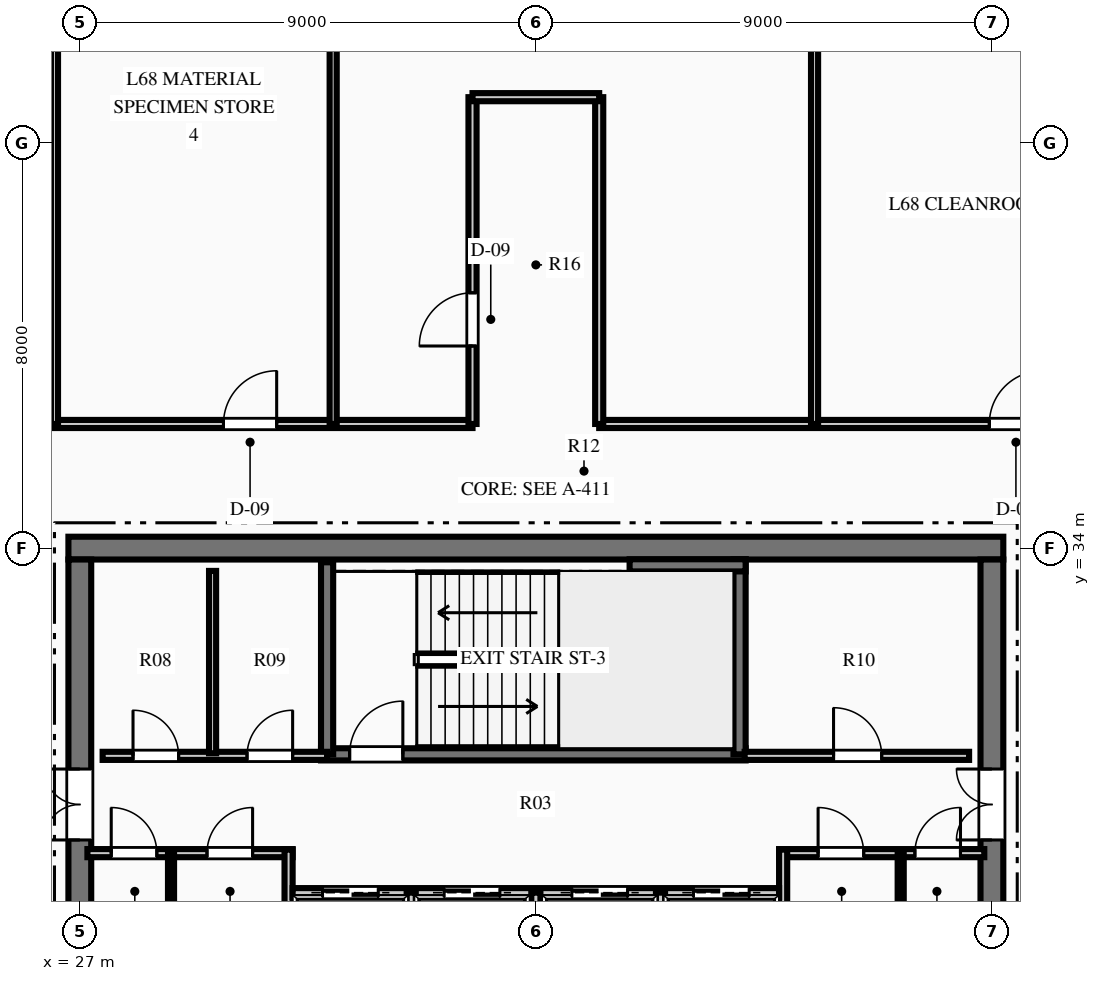
"""IFC4 building model, lengths in metres.
Left out: names, types, materials, properties, quantities, classifications, styles, units other than length and angle.
Written with IfcOpenShell. Run it as: python <this file> out.ifc"""

import sys

from ifc_helpers import new_model, si_unit, direction, frame, frame_2d, origin, place, context, subcontext, project, spatial, rectangle, extrude, element, fill, save


model = new_model("IFC4")
c1 = context("Model", 3, precision=1e-05, world=origin(), true_north=direction((0.0, 1.0)))
c2 = subcontext(c1, "Body", "Model", "MODEL_VIEW")
j1 = project(units=[si_unit("LENGTHUNIT", "METRE"), si_unit("PLANEANGLEUNIT", "RADIAN")], contexts=[c1])
p1 = place(None, origin())
s1 = spatial("IfcSite", under=j1, at=p1, CompositionType="ELEMENT")
p2 = place(p1, origin())
s2 = spatial("IfcBuilding", under=s1, at=p2, CompositionType="ELEMENT")
p3 = place(p2, frame((0.0, 0.0, 271.2)))
s3 = spatial("IfcBuildingStorey", under=s2, at=p3, CompositionType="ELEMENT", Elevation=271.2)
p4 = place(p3, frame((26.775, 34.0, 0.0), z_axis=(0.0, 0.0, 1.0), x_axis=(1.0, 0.0, 0.0)))
e1 = element("IfcWall", 1, at=p4, inside=s3, PredefinedType="SHEAR", context=c2, shape_type="SweptSolid", body=[
    extrude(rectangle(XDim=18.45, YDim=0.45, at=frame_2d((9.225, 0.0))), origin(), (0.0, 0.0, 1.0), 3.75),
])
p5 = place(p3, frame((27.0, 18.225, 0.0), z_axis=(0.0, 0.0, 1.0), x_axis=(0.0, 1.0, 0.0)))
e2 = element("IfcWall", 2, at=p5, inside=s3, PredefinedType="SHEAR", context=c2, shape_type="SweptSolid", body=[
    extrude(rectangle(XDim=15.55, YDim=0.45, at=frame_2d((7.775, 0.0))), origin(), (0.0, 0.0, 1.0), 3.75),
])
p6 = place(p5, frame((10.015, 0.0, 0.0)))
e3 = element("IfcOpeningElement", 3, at=p6, cuts=e2, PredefinedType="OPENING", context=c2, shape_type="SweptSolid", body=[
    extrude(rectangle(XDim=1.4, YDim=2.2, at=frame_2d((0.7, 1.1))), frame((0.0, 0.235, 0.0), z_axis=(0.0, -1.0, 0.0), x_axis=(1.0, 0.0, 0.0)), (0.0, 0.0, 1.0), 0.47),
])
p7 = place(p3, frame((45.0, 18.225, 0.0), z_axis=(0.0, 0.0, 1.0), x_axis=(0.0, 1.0, 0.0)))
e4 = element("IfcWall", 4, at=p7, inside=s3, PredefinedType="SHEAR", context=c2, shape_type="SweptSolid", body=[
    extrude(rectangle(XDim=15.55, YDim=0.45, at=frame_2d((7.775, 0.0))), origin(), (0.0, 0.0, 1.0), 3.75),
])
p8 = place(p7, frame((10.015, 0.0, 0.0)))
e5 = element("IfcOpeningElement", 5, at=p8, cuts=e4, PredefinedType="OPENING", context=c2, shape_type="SweptSolid", body=[
    extrude(rectangle(XDim=1.4, YDim=2.2, at=frame_2d((0.7, 1.1))), frame((0.0, 0.235, 0.0), z_axis=(0.0, -1.0, 0.0), x_axis=(1.0, 0.0, 0.0)), (0.0, 0.0, 1.0), 0.47),
])
p9 = place(p3, frame((31.76, 29.93, 0.0), z_axis=(0.0, 0.0, 1.0), x_axis=(1.0, 0.0, 0.0)))
e6 = element("IfcWall", 6, at=p9, inside=s3, PredefinedType="SHEAR", context=c2, shape_type="SweptSolid", body=[
    extrude(rectangle(XDim=8.38, YDim=0.24, at=frame_2d((4.19, 0.0))), origin(), (0.0, 0.0, 1.0), 3.75),
])
p10 = place(p9, frame((0.565, 0.0, 0.0)))
e7 = element("IfcOpeningElement", 7, at=p10, cuts=e6, PredefinedType="OPENING", context=c2, shape_type="SweptSolid", body=[
    extrude(rectangle(XDim=1.05, YDim=2.15, at=frame_2d((0.525, 1.075))), frame((0.0, 0.13, 0.0), z_axis=(0.0, -1.0, 0.0), x_axis=(1.0, 0.0, 0.0)), (0.0, 0.0, 1.0), 0.26),
])
p11 = place(p3, frame((31.88, 29.93, 0.0), z_axis=(0.0, 0.0, 1.0), x_axis=(0.0, 1.0, 0.0)))
e8 = element("IfcWall", 8, at=p11, inside=s3, PredefinedType="SHEAR", context=c2, shape_type="SweptSolid", body=[
    extrude(rectangle(XDim=3.79, YDim=0.24, at=frame_2d((1.895, 0.0))), origin(), (0.0, 0.0, 1.0), 3.75),
])
p12 = place(p3, frame((40.02, 29.93, 0.0), z_axis=(0.0, 0.0, 1.0), x_axis=(0.0, 1.0, 0.0)))
e9 = element("IfcWall", 9, at=p12, inside=s3, PredefinedType="SHEAR", context=c2, shape_type="SweptSolid", body=[
    extrude(rectangle(XDim=3.85, YDim=0.24, at=frame_2d((1.925, 0.0))), origin(), (0.0, 0.0, 1.0), 3.75),
])
p13 = place(p3, frame((37.85, 33.66, 0.0), z_axis=(0.0, 0.0, 1.0), x_axis=(1.0, 0.0, 0.0)))
e10 = element("IfcWall", 10, at=p13, inside=s3, PredefinedType="SHEAR", context=c2, shape_type="SweptSolid", body=[
    extrude(rectangle(XDim=2.29, YDim=0.24, at=frame_2d((1.145, 0.0))), origin(), (0.0, 0.0, 1.0), 3.75),
])
p14 = place(p3, frame((27.15, 27.98, 0.0), z_axis=(0.0, 0.0, 1.0), x_axis=(1.0, 0.0, 0.0)))
e11 = element("IfcWall", 11, at=p14, inside=s3, PredefinedType="PARTITIONING", context=c2, shape_type="SweptSolid", body=[
    extrude(rectangle(XDim=4.05, YDim=0.16, at=frame_2d((2.025, 0.0))), origin(), (0.0, 0.0, 1.0), 3.48),
])
p15 = place(p14, frame((0.47, 0.0, 0.0)))
e12 = element("IfcOpeningElement", 12, at=p15, cuts=e11, PredefinedType="OPENING", context=c2, shape_type="SweptSolid", body=[
    extrude(rectangle(XDim=0.9, YDim=2.15, at=frame_2d((0.45, 1.075))), frame((0.0, 0.09, 0.0), z_axis=(0.0, -1.0, 0.0), x_axis=(1.0, 0.0, 0.0)), (0.0, 0.0, 1.0), 0.18),
])
p16 = place(p14, frame((2.36, 0.0, 0.0)))
e13 = element("IfcOpeningElement", 13, at=p16, cuts=e11, PredefinedType="OPENING", context=c2, shape_type="SweptSolid", body=[
    extrude(rectangle(XDim=0.9, YDim=2.15, at=frame_2d((0.45, 1.075))), frame((0.0, 0.09, 0.0), z_axis=(0.0, -1.0, 0.0), x_axis=(1.0, 0.0, 0.0)), (0.0, 0.0, 1.0), 0.18),
])
p17 = place(p3, frame((31.12, 26.54, 0.0), z_axis=(0.0, 0.0, 1.0), x_axis=(0.0, 1.0, 0.0)))
e14 = element("IfcWall", 14, at=p17, inside=s3, PredefinedType="PARTITIONING", context=c2, shape_type="SweptSolid", body=[
    extrude(rectangle(XDim=1.51, YDim=0.16, at=frame_2d((0.755, 0.0))), origin(), (0.0, 0.0, 1.0), 3.48),
])
p18 = place(p3, frame((40.8, 27.98, 0.0), z_axis=(0.0, 0.0, 1.0), x_axis=(1.0, 0.0, 0.0)))
e15 = element("IfcWall", 15, at=p18, inside=s3, PredefinedType="PARTITIONING", context=c2, shape_type="SweptSolid", body=[
    extrude(rectangle(XDim=4.05, YDim=0.16, at=frame_2d((2.025, 0.0))), origin(), (0.0, 0.0, 1.0), 3.48),
])
p19 = place(p18, frame((0.77, 0.0, 0.0)))
e16 = element("IfcOpeningElement", 16, at=p19, cuts=e15, PredefinedType="OPENING", context=c2, shape_type="SweptSolid", body=[
    extrude(rectangle(XDim=0.9, YDim=2.15, at=frame_2d((0.45, 1.075))), frame((0.0, 0.09, 0.0), z_axis=(0.0, -1.0, 0.0), x_axis=(1.0, 0.0, 0.0)), (0.0, 0.0, 1.0), 0.18),
])
p20 = place(p18, frame((2.68, 0.0, 0.0)))
e17 = element("IfcOpeningElement", 17, at=p20, cuts=e15, PredefinedType="OPENING", context=c2, shape_type="SweptSolid", body=[
    extrude(rectangle(XDim=0.9, YDim=2.15, at=frame_2d((0.45, 1.075))), frame((0.0, 0.09, 0.0), z_axis=(0.0, -1.0, 0.0), x_axis=(1.0, 0.0, 0.0)), (0.0, 0.0, 1.0), 0.18),
])
p21 = place(p3, frame((40.88, 26.54, 0.0), z_axis=(0.0, 0.0, 1.0), x_axis=(0.0, 1.0, 0.0)))
e18 = element("IfcWall", 18, at=p21, inside=s3, PredefinedType="PARTITIONING", context=c2, shape_type="SweptSolid", body=[
    extrude(rectangle(XDim=1.51, YDim=0.16, at=frame_2d((0.755, 0.0))), origin(), (0.0, 0.0, 1.0), 3.48),
])
for number, where, z_axis, x_axis in (
    (19, (28.8, 26.54, 0.0), (0.0, 0.0, 1.0), (0.0, 1.0, 0.0)),
    (20, (43.2, 26.54, 0.0), (0.0, 0.0, 1.0), (0.0, 1.0, 0.0)),
):
    element("IfcWall", number, at=place(p3, frame(where, z_axis=z_axis, x_axis=x_axis)), inside=s3, PredefinedType="PARTITIONING", context=c2, shape_type="SweptSolid", body=[
        extrude(rectangle(XDim=1.44, YDim=0.12, at=frame_2d((0.72, 0.0))), origin(), (0.0, 0.0, 1.0), 3.48),
    ])
p22 = place(p3, frame((27.45, 29.9, 0.0), z_axis=(0.0, 0.0, 1.0), x_axis=(1.0, 0.0, 0.0)))
e21 = element("IfcWall", 21, at=p22, inside=s3, PredefinedType="PARTITIONING", context=c2, shape_type="SweptSolid", body=[
    extrude(rectangle(XDim=4.43, YDim=0.16, at=frame_2d((2.215, 0.0))), origin(), (0.0, 0.0, 1.0), 3.48),
])
p23 = place(p22, frame((0.6, 0.0, 0.0)))
e22 = element("IfcOpeningElement", 22, at=p23, cuts=e21, PredefinedType="OPENING", context=c2, shape_type="SweptSolid", body=[
    extrude(rectangle(XDim=0.9, YDim=2.15, at=frame_2d((0.45, 1.075))), frame((0.0, 0.09, 0.0), z_axis=(0.0, -1.0, 0.0), x_axis=(1.0, 0.0, 0.0)), (0.0, 0.0, 1.0), 0.18),
])
p24 = place(p22, frame((2.85, 0.0, 0.0)))
e23 = element("IfcOpeningElement", 23, at=p24, cuts=e21, PredefinedType="OPENING", context=c2, shape_type="SweptSolid", body=[
    extrude(rectangle(XDim=0.9, YDim=2.15, at=frame_2d((0.45, 1.075))), frame((0.0, 0.09, 0.0), z_axis=(0.0, -1.0, 0.0), x_axis=(1.0, 0.0, 0.0)), (0.0, 0.0, 1.0), 0.18),
])
p25 = place(p3, frame((29.62, 29.95, 0.0), z_axis=(0.0, 0.0, 1.0), x_axis=(0.0, 1.0, 0.0)))
e24 = element("IfcWall", 24, at=p25, inside=s3, PredefinedType="PARTITIONING", context=c2, shape_type="SweptSolid", body=[
    extrude(rectangle(XDim=3.6, YDim=0.14, at=frame_2d((1.8, 0.0))), origin(), (0.0, 0.0, 1.0), 3.48),
])
p26 = place(p3, frame((40.12, 29.9, 0.0), z_axis=(0.0, 0.0, 1.0), x_axis=(1.0, 0.0, 0.0)))
e25 = element("IfcWall", 25, at=p26, inside=s3, PredefinedType="PARTITIONING", context=c2, shape_type="SweptSolid", body=[
    extrude(rectangle(XDim=4.43, YDim=0.16, at=frame_2d((2.215, 0.0))), origin(), (0.0, 0.0, 1.0), 3.48),
])
p27 = place(p26, frame((1.755, 0.0, 0.0)))
e26 = element("IfcOpeningElement", 26, at=p27, cuts=e25, PredefinedType="OPENING", context=c2, shape_type="SweptSolid", body=[
    extrude(rectangle(XDim=0.95, YDim=2.15, at=frame_2d((0.475, 1.075))), frame((0.0, 0.09, 0.0), z_axis=(0.0, -1.0, 0.0), x_axis=(1.0, 0.0, 0.0)), (0.0, 0.0, 1.0), 0.18),
])
p28 = place(p3, frame((31.2, 27.2, 0.0), z_axis=(0.0, 0.0, 1.0), x_axis=(1.0, 0.0, 0.0)))
e27 = element("IfcWall", 27, at=p28, inside=s3, PredefinedType="PARTITIONING", context=c2, shape_type="SweptSolid", body=[
    extrude(rectangle(XDim=9.6, YDim=0.18, at=frame_2d((4.8, 0.0))), origin(), (0.0, 0.0, 1.0), 3.48),
])
p29 = place(p28, frame((0.59, 0.0, 0.0)))
e28 = element("IfcOpeningElement", 28, at=p29, cuts=e27, PredefinedType="OPENING", context=c2, shape_type="SweptSolid", body=[
    extrude(rectangle(XDim=1.1, YDim=2.15, at=frame_2d((0.55, 1.075))), frame((0.0, 0.1, 0.0), z_axis=(0.0, -1.0, 0.0), x_axis=(1.0, 0.0, 0.0)), (0.0, 0.0, 1.0), 0.2),
])
p30 = place(p28, frame((2.99, 0.0, 0.0)))
e29 = element("IfcOpeningElement", 29, at=p30, cuts=e27, PredefinedType="OPENING", context=c2, shape_type="SweptSolid", body=[
    extrude(rectangle(XDim=1.1, YDim=2.15, at=frame_2d((0.55, 1.075))), frame((0.0, 0.1, 0.0), z_axis=(0.0, -1.0, 0.0), x_axis=(1.0, 0.0, 0.0)), (0.0, 0.0, 1.0), 0.2),
])
p31 = place(p28, frame((5.51, 0.0, 0.0)))
e30 = element("IfcOpeningElement", 30, at=p31, cuts=e27, PredefinedType="OPENING", context=c2, shape_type="SweptSolid", body=[
    extrude(rectangle(XDim=1.1, YDim=2.15, at=frame_2d((0.55, 1.075))), frame((0.0, 0.1, 0.0), z_axis=(0.0, -1.0, 0.0), x_axis=(1.0, 0.0, 0.0)), (0.0, 0.0, 1.0), 0.2),
])
p32 = place(p28, frame((7.91, 0.0, 0.0)))
e31 = element("IfcOpeningElement", 31, at=p32, cuts=e27, PredefinedType="OPENING", context=c2, shape_type="SweptSolid", body=[
    extrude(rectangle(XDim=1.1, YDim=2.15, at=frame_2d((0.55, 1.075))), frame((0.0, 0.1, 0.0), z_axis=(0.0, -1.0, 0.0), x_axis=(1.0, 0.0, 0.0)), (0.0, 0.0, 1.0), 0.2),
])
for number, where, z_axis, x_axis in (
    (32, (33.54, 25.3, 0.0), (0.0, 0.0, 1.0), (0.0, 1.0, 0.0)),
    (33, (36.0, 25.3, 0.0), (0.0, 0.0, 1.0), (0.0, 1.0, 0.0)),
    (34, (38.46, 25.3, 0.0), (0.0, 0.0, 1.0), (0.0, 1.0, 0.0)),
):
    element("IfcWall", number, at=place(p3, frame(where, z_axis=z_axis, x_axis=x_axis)), inside=s3, PredefinedType="PARTITIONING", context=c2, shape_type="SweptSolid", body=[
        extrude(rectangle(XDim=1.9, YDim=0.18, at=frame_2d((0.95, 0.0))), origin(), (0.0, 0.0, 1.0), 3.48),
    ])
p33 = place(p3, frame((24.5, 36.45, 0.0), z_axis=(0.0, 0.0, 1.0), x_axis=(1.0, 0.0, 0.0)))
e35 = element("IfcWall", 35, at=p33, inside=s3, PredefinedType="PARTITIONING", context=c2, shape_type="SweptSolid", body=[
    extrude(rectangle(XDim=10.25, YDim=0.16, at=frame_2d((5.125, 0.0))), origin(), (0.0, 0.0, 1.0), 3.48),
])
p34 = place(p33, frame((0.67, 0.0, 0.0)))
e36 = element("IfcOpeningElement", 36, at=p34, cuts=e35, PredefinedType="OPENING", context=c2, shape_type="SweptSolid", body=[
    extrude(rectangle(XDim=1.05, YDim=2.15, at=frame_2d((0.525, 1.075))), frame((0.0, 0.09, 0.0), z_axis=(0.0, -1.0, 0.0), x_axis=(1.0, 0.0, 0.0)), (0.0, 0.0, 1.0), 0.18),
])
p35 = place(p33, frame((5.335, 0.0, 0.0)))
e37 = element("IfcOpeningElement", 37, at=p35, cuts=e35, PredefinedType="OPENING", context=c2, shape_type="SweptSolid", body=[
    extrude(rectangle(XDim=1.05, YDim=2.15, at=frame_2d((0.525, 1.075))), frame((0.0, 0.09, 0.0), z_axis=(0.0, -1.0, 0.0), x_axis=(1.0, 0.0, 0.0)), (0.0, 0.0, 1.0), 0.18),
])
p36 = place(p3, frame((37.25, 36.45, 0.0), z_axis=(0.0, 0.0, 1.0), x_axis=(1.0, 0.0, 0.0)))
e38 = element("IfcWall", 38, at=p36, inside=s3, PredefinedType="PARTITIONING", context=c2, shape_type="SweptSolid", body=[
    extrude(rectangle(XDim=10.25, YDim=0.16, at=frame_2d((5.125, 0.0))), origin(), (0.0, 0.0, 1.0), 3.48),
])
p37 = place(p36, frame((7.699, 0.0, 0.0)))
e39 = element("IfcOpeningElement", 39, at=p37, cuts=e38, PredefinedType="OPENING", context=c2, shape_type="SweptSolid", body=[
    extrude(rectangle(XDim=1.05, YDim=2.15, at=frame_2d((0.525, 1.075))), frame((0.0, 0.09, 0.0), z_axis=(0.0, -1.0, 0.0), x_axis=(1.0, 0.0, 0.0)), (0.0, 0.0, 1.0), 0.18),
])
p38 = place(p3, frame((34.75, 36.45, 0.0), z_axis=(0.0, 0.0, 1.0), x_axis=(0.0, 1.0, 0.0)))
e40 = element("IfcWall", 40, at=p38, inside=s3, PredefinedType="PARTITIONING", context=c2, shape_type="SweptSolid", body=[
    extrude(rectangle(XDim=6.45, YDim=0.16, at=frame_2d((3.225, 0.0))), origin(), (0.0, 0.0, 1.0), 3.48),
])
p39 = place(p38, frame((1.539, 0.0, 0.0)))
e41 = element("IfcOpeningElement", 41, at=p39, cuts=e40, PredefinedType="OPENING", context=c2, shape_type="SweptSolid", body=[
    extrude(rectangle(XDim=1.05, YDim=2.15, at=frame_2d((0.525, 1.075))), frame((0.0, 0.09, 0.0), z_axis=(0.0, -1.0, 0.0), x_axis=(1.0, 0.0, 0.0)), (0.0, 0.0, 1.0), 0.18),
])
p40 = place(p3, frame((37.25, 36.45, 0.0), z_axis=(0.0, 0.0, 1.0), x_axis=(0.0, 1.0, 0.0)))
e42 = element("IfcWall", 42, at=p40, inside=s3, PredefinedType="PARTITIONING", context=c2, shape_type="SweptSolid", body=[
    extrude(rectangle(XDim=6.45, YDim=0.16, at=frame_2d((3.225, 0.0))), origin(), (0.0, 0.0, 1.0), 3.48),
])
p41 = place(p3, frame((34.75, 42.9, 0.0), z_axis=(0.0, 0.0, 1.0), x_axis=(1.0, 0.0, 0.0)))
e43 = element("IfcWall", 43, at=p41, inside=s3, PredefinedType="PARTITIONING", context=c2, shape_type="SweptSolid", body=[
    extrude(rectangle(XDim=2.5, YDim=0.16, at=frame_2d((1.25, 0.0))), origin(), (0.0, 0.0, 1.0), 3.48),
])
p42 = place(p3, frame((26.5, 36.45, 0.0), z_axis=(0.0, 0.0, 1.0), x_axis=(0.0, 1.0, 0.0)))
e44 = element("IfcWall", 44, at=p42, inside=s3, PredefinedType="PARTITIONING", context=c2, shape_type="SweptSolid", body=[
    extrude(rectangle(XDim=16.688, YDim=0.14, at=frame_2d((8.344, 0.0))), origin(), (0.0, 0.0, 1.0), 2.858),
])
p43 = place(p3, frame((32.0, 36.45, 0.0), z_axis=(0.0, 0.0, 1.0), x_axis=(0.0, 1.0, 0.0)))
e45 = element("IfcWall", 45, at=p43, inside=s3, PredefinedType="PARTITIONING", context=c2, shape_type="SweptSolid", body=[
    extrude(rectangle(XDim=14.948, YDim=0.14, at=frame_2d((7.474, 0.0))), origin(), (0.0, 0.0, 1.0), 2.858),
])
p44 = place(p3, frame((41.5, 36.45, 0.0), z_axis=(0.0, 0.0, 1.0), x_axis=(0.0, 1.0, 0.0)))
e46 = element("IfcWall", 46, at=p44, inside=s3, PredefinedType="PARTITIONING", context=c2, shape_type="SweptSolid", body=[
    extrude(rectangle(XDim=11.944, YDim=0.14, at=frame_2d((5.972, 0.0))), origin(), (0.0, 0.0, 1.0), 3.48),
])
p45 = place(p15, origin())
e47 = element("IfcDoor", 47, at=p45, inside=s3, OperationType="SINGLE_SWING_LEFT", PredefinedType="DOOR", context=c2, shape_type="SweptSolid", body=[
    extrude(rectangle(XDim=0.9, YDim=2.15, at=frame_2d((0.45, 1.075))), frame((0.0, 0.025, 0.0), z_axis=(0.0, -1.0, 0.0), x_axis=(1.0, 0.0, 0.0)), (0.0, 0.0, 1.0), 0.05),
])
fill(e12, e47)
p46 = place(p16, origin())
e48 = element("IfcDoor", 48, at=p46, inside=s3, OperationType="SINGLE_SWING_RIGHT", PredefinedType="DOOR", context=c2, shape_type="SweptSolid", body=[
    extrude(rectangle(XDim=0.9, YDim=2.15, at=frame_2d((0.45, 1.075))), frame((0.0, 0.025, 0.0), z_axis=(0.0, -1.0, 0.0), x_axis=(1.0, 0.0, 0.0)), (0.0, 0.0, 1.0), 0.05),
])
fill(e13, e48)
p47 = place(p19, origin())
e49 = element("IfcDoor", 49, at=p47, inside=s3, OperationType="SINGLE_SWING_LEFT", PredefinedType="DOOR", context=c2, shape_type="SweptSolid", body=[
    extrude(rectangle(XDim=0.9, YDim=2.15, at=frame_2d((0.45, 1.075))), frame((0.0, 0.025, 0.0), z_axis=(0.0, -1.0, 0.0), x_axis=(1.0, 0.0, 0.0)), (0.0, 0.0, 1.0), 0.05),
])
fill(e16, e49)
p48 = place(p20, origin())
e50 = element("IfcDoor", 50, at=p48, inside=s3, OperationType="SINGLE_SWING_RIGHT", PredefinedType="DOOR", context=c2, shape_type="SweptSolid", body=[
    extrude(rectangle(XDim=0.9, YDim=2.15, at=frame_2d((0.45, 1.075))), frame((0.0, 0.025, 0.0), z_axis=(0.0, -1.0, 0.0), x_axis=(1.0, 0.0, 0.0)), (0.0, 0.0, 1.0), 0.05),
])
fill(e17, e50)
p49 = place(p23, origin())
e51 = element("IfcDoor", 51, at=p49, inside=s3, OperationType="SINGLE_SWING_LEFT", PredefinedType="DOOR", context=c2, shape_type="SweptSolid", body=[
    extrude(rectangle(XDim=0.9, YDim=2.15, at=frame_2d((0.45, 1.075))), frame((0.0, 0.025, 0.0), z_axis=(0.0, -1.0, 0.0), x_axis=(1.0, 0.0, 0.0)), (0.0, 0.0, 1.0), 0.05),
])
fill(e22, e51)
p50 = place(p24, origin())
e52 = element("IfcDoor", 52, at=p50, inside=s3, OperationType="SINGLE_SWING_RIGHT", PredefinedType="DOOR", context=c2, shape_type="SweptSolid", body=[
    extrude(rectangle(XDim=0.9, YDim=2.15, at=frame_2d((0.45, 1.075))), frame((0.0, 0.025, 0.0), z_axis=(0.0, -1.0, 0.0), x_axis=(1.0, 0.0, 0.0)), (0.0, 0.0, 1.0), 0.05),
])
fill(e23, e52)
p51 = place(p27, origin())
e53 = element("IfcDoor", 53, at=p51, inside=s3, OperationType="SINGLE_SWING_LEFT", PredefinedType="DOOR", context=c2, shape_type="SweptSolid", body=[
    extrude(rectangle(XDim=0.95, YDim=2.15, at=frame_2d((0.475, 1.075))), frame((0.0, 0.025, 0.0), z_axis=(0.0, -1.0, 0.0), x_axis=(1.0, 0.0, 0.0)), (0.0, 0.0, 1.0), 0.05),
])
fill(e26, e53)
p52 = place(p10, origin())
e54 = element("IfcDoor", 54, at=p52, inside=s3, OperationType="SINGLE_SWING_RIGHT", PredefinedType="DOOR", context=c2, shape_type="SweptSolid", body=[
    extrude(rectangle(XDim=1.05, YDim=2.15, at=frame_2d((0.525, 1.075))), frame((0.0, 0.025, 0.0), z_axis=(0.0, -1.0, 0.0), x_axis=(1.0, 0.0, 0.0)), (0.0, 0.0, 1.0), 0.05),
])
fill(e7, e54)
p53 = place(p6, origin())
e55 = element("IfcDoor", 55, at=p53, inside=s3, OperationType="DOUBLE_DOOR_SINGLE_SWING", PredefinedType="DOOR", context=c2, shape_type="SweptSolid", body=[
    extrude(rectangle(XDim=1.4, YDim=2.2, at=frame_2d((0.7, 1.1))), frame((0.0, 0.025, 0.0), z_axis=(0.0, -1.0, 0.0), x_axis=(1.0, 0.0, 0.0)), (0.0, 0.0, 1.0), 0.05),
])
fill(e3, e55)
p54 = place(p8, origin())
e56 = element("IfcDoor", 56, at=p54, inside=s3, OperationType="DOUBLE_DOOR_SINGLE_SWING", PredefinedType="DOOR", context=c2, shape_type="SweptSolid", body=[
    extrude(rectangle(XDim=1.4, YDim=2.2, at=frame_2d((0.7, 1.1))), frame((0.0, 0.025, 0.0), z_axis=(0.0, -1.0, 0.0), x_axis=(1.0, 0.0, 0.0)), (0.0, 0.0, 1.0), 0.05),
])
fill(e5, e56)
p55 = place(p35, origin())
e57 = element("IfcDoor", 57, at=p55, inside=s3, OperationType="SINGLE_SWING_RIGHT", PredefinedType="DOOR", context=c2, shape_type="SweptSolid", body=[
    extrude(rectangle(XDim=1.05, YDim=2.15, at=frame_2d((0.525, 1.075))), frame((0.0, 0.025, 0.0), z_axis=(0.0, -1.0, 0.0), x_axis=(1.0, 0.0, 0.0)), (0.0, 0.0, 1.0), 0.05),
])
fill(e37, e57)
p56 = place(p39, origin())
e58 = element("IfcDoor", 58, at=p56, inside=s3, OperationType="SINGLE_SWING_LEFT", PredefinedType="DOOR", context=c2, shape_type="SweptSolid", body=[
    extrude(rectangle(XDim=1.05, YDim=2.15, at=frame_2d((0.525, 1.075))), frame((0.0, 0.025, 0.0), z_axis=(0.0, -1.0, 0.0), x_axis=(1.0, 0.0, 0.0)), (0.0, 0.0, 1.0), 0.05),
])
fill(e41, e58)
p57 = place(p37, origin())
e59 = element("IfcDoor", 59, at=p57, inside=s3, OperationType="SINGLE_SWING_RIGHT", PredefinedType="DOOR", context=c2, shape_type="SweptSolid", body=[
    extrude(rectangle(XDim=1.05, YDim=2.15, at=frame_2d((0.525, 1.075))), frame((0.0, 0.025, 0.0), z_axis=(0.0, -1.0, 0.0), x_axis=(1.0, 0.0, 0.0)), (0.0, 0.0, 1.0), 0.05),
])
fill(e39, e59)
p58 = place(p29, origin())
e60 = element("IfcDoor", 60, at=p58, inside=s3, OperationType="SLIDING_TO_LEFT", PredefinedType="DOOR", context=c2, shape_type="SweptSolid", body=[
    extrude(rectangle(XDim=1.1, YDim=2.15, at=frame_2d((0.55, 1.075))), frame((0.0, 0.025, 0.0), z_axis=(0.0, -1.0, 0.0), x_axis=(1.0, 0.0, 0.0)), (0.0, 0.0, 1.0), 0.05),
])
fill(e28, e60)
p59 = place(p30, origin())
e61 = element("IfcDoor", 61, at=p59, inside=s3, OperationType="SLIDING_TO_LEFT", PredefinedType="DOOR", context=c2, shape_type="SweptSolid", body=[
    extrude(rectangle(XDim=1.1, YDim=2.15, at=frame_2d((0.55, 1.075))), frame((0.0, 0.025, 0.0), z_axis=(0.0, -1.0, 0.0), x_axis=(1.0, 0.0, 0.0)), (0.0, 0.0, 1.0), 0.05),
])
fill(e29, e61)
p60 = place(p31, origin())
e62 = element("IfcDoor", 62, at=p60, inside=s3, OperationType="SLIDING_TO_LEFT", PredefinedType="DOOR", context=c2, shape_type="SweptSolid", body=[
    extrude(rectangle(XDim=1.1, YDim=2.15, at=frame_2d((0.55, 1.075))), frame((0.0, 0.025, 0.0), z_axis=(0.0, -1.0, 0.0), x_axis=(1.0, 0.0, 0.0)), (0.0, 0.0, 1.0), 0.05),
])
fill(e30, e62)
p61 = place(p32, origin())
e63 = element("IfcDoor", 63, at=p61, inside=s3, OperationType="SLIDING_TO_LEFT", PredefinedType="DOOR", context=c2, shape_type="SweptSolid", body=[
    extrude(rectangle(XDim=1.1, YDim=2.15, at=frame_2d((0.55, 1.075))), frame((0.0, 0.025, 0.0), z_axis=(0.0, -1.0, 0.0), x_axis=(1.0, 0.0, 0.0)), (0.0, 0.0, 1.0), 0.05),
])
fill(e31, e63)
save(model, sys.argv[1])
